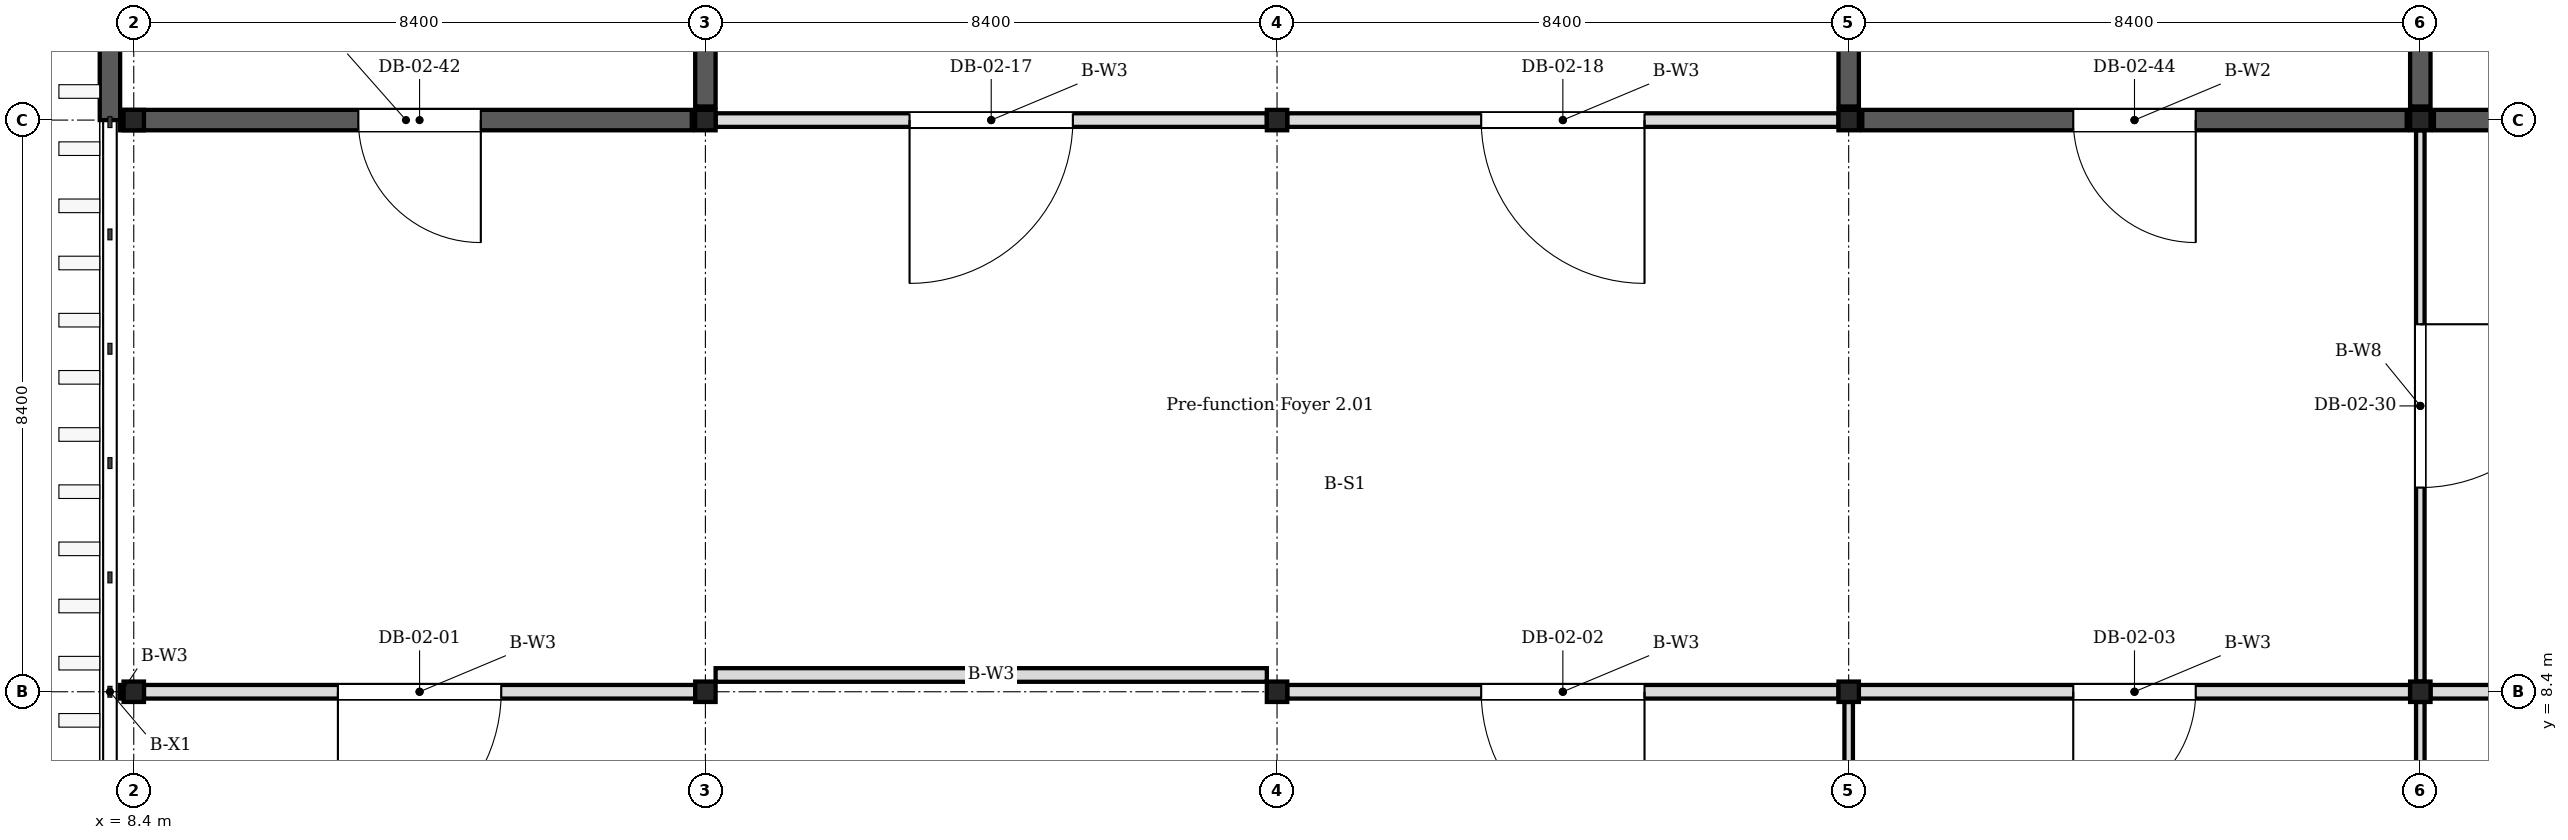
"""IFC4 building model, lengths in metres.
Left out: names, types, materials, properties, quantities, classifications, styles, units other than length and angle.
Written with IfcOpenShell. Run it as: python <this file> out.ifc"""

import sys

from ifc_helpers import new_model, si_unit, direction, frame, frame_2d, origin, origin_2d, place, context, subcontext, project, spatial, rectangle, i_section, extrude, element, fill, save


model = new_model("IFC4")
c1 = context("Model", 3, precision=1e-05, world=origin(), true_north=direction((0.0, 1.0)))
c2 = subcontext(c1, "Body", "Model", "MODEL_VIEW")
j1 = project(units=[si_unit("LENGTHUNIT", "METRE"), si_unit("PLANEANGLEUNIT", "RADIAN")], contexts=[c1])
p1 = place(None, origin())
s1 = spatial("IfcSite", under=j1, at=p1, CompositionType="ELEMENT")
p2 = place(p1, origin())
s2 = spatial("IfcBuilding", under=s1, at=p2, CompositionType="ELEMENT")
p3 = place(p2, frame((0.0, 0.0, 10.2)))
s3 = spatial("IfcBuildingStorey", under=s2, at=p3, CompositionType="ELEMENT", Elevation=10.2)
for number, where, z_axis, x_axis in (
    (1, (8.4, 8.4, 0.0), (0.0, 0.0, 1.0), (1.0, 0.0, 0.0)),
    (2, (8.4, 16.8, 0.0), (0.0, 0.0, 1.0), (1.0, 0.0, 0.0)),
    (3, (16.8, 8.4, 0.0), (0.0, 0.0, 1.0), (1.0, 0.0, 0.0)),
    (4, (16.8, 16.8, 0.0), (0.0, 0.0, 1.0), (1.0, 0.0, 0.0)),
    (5, (25.2, 8.4, 0.0), (0.0, 0.0, 1.0), (1.0, 0.0, 0.0)),
    (6, (25.2, 16.8, 0.0), (0.0, 0.0, 1.0), (1.0, 0.0, 0.0)),
    (7, (33.6, 8.4, 0.0), (0.0, 0.0, 1.0), (1.0, 0.0, 0.0)),
    (8, (33.6, 16.8, 0.0), (0.0, 0.0, 1.0), (1.0, 0.0, 0.0)),
    (9, (42.0, 8.4, 0.0), (0.0, 0.0, 1.0), (1.0, 0.0, 0.0)),
    (10, (42.0, 16.8, 0.0), (0.0, 0.0, 1.0), (1.0, 0.0, 0.0)),
):
    element("IfcColumn", number, at=place(p3, frame(where, z_axis=z_axis, x_axis=x_axis)), inside=s3, PredefinedType="COLUMN", context=c2, shape_type="SweptSolid", body=[
        extrude(i_section(OverallWidth=0.3, OverallDepth=0.3, WebThickness=0.01, FlangeThickness=0.015, FilletRadius=0.013, at=origin_2d()), origin(), (0.0, 0.0, 1.0), 4.2),
    ])
p4 = place(p3, frame((42.0, 17.0, 0.0), z_axis=(0.0, 0.0, 1.0), x_axis=(0.0, 1.0, 0.0)))
e11 = element("IfcWall", 11, at=p4, inside=s3, PredefinedType="SHEAR", context=c2, shape_type="SweptSolid", body=[
    extrude(rectangle(XDim=8.0, YDim=0.3, at=frame_2d((4.0, 0.0))), origin(), (0.0, 0.0, 1.0), 4.05),
])
p5 = place(p3, frame((42.2, 16.8, 0.0), z_axis=(0.0, 0.0, 1.0), x_axis=(1.0, 0.0, 0.0)))
e12 = element("IfcWall", 12, at=p5, inside=s3, PredefinedType="SHEAR", context=c2, shape_type="SweptSolid", body=[
    extrude(rectangle(XDim=8.0, YDim=0.3, at=frame_2d((4.0, 0.0))), origin(), (0.0, 0.0, 1.0), 4.05),
])
p6 = place(p5, frame((3.1, 0.0, 0.0)))
e13 = element("IfcOpeningElement", 13, at=p6, cuts=e12, PredefinedType="OPENING", context=c2, shape_type="SweptSolid", body=[
    extrude(rectangle(XDim=1.8, YDim=2.1, at=frame_2d((0.9, 1.05))), frame((0.0, 0.16, 0.0), z_axis=(0.0, -1.0, 0.0), x_axis=(1.0, 0.0, 0.0)), (0.0, 0.0, 1.0), 0.32),
])
p7 = place(p3, frame((8.05, 16.8, 0.0), z_axis=(0.0, 0.0, 1.0), x_axis=(0.0, 1.0, 0.0)))
e14 = element("IfcWall", 14, at=p7, inside=s3, PredefinedType="SHEAR", context=c2, shape_type="SweptSolid", body=[
    extrude(rectangle(XDim=8.6, YDim=0.3, at=frame_2d((4.3, 0.0))), origin(), (0.0, 0.0, 1.0), 4.05),
])
p8 = place(p3, frame((16.8, 17.0, 0.0), z_axis=(0.0, 0.0, 1.0), x_axis=(0.0, 1.0, 0.0)))
e15 = element("IfcWall", 15, at=p8, inside=s3, PredefinedType="SHEAR", context=c2, shape_type="SweptSolid", body=[
    extrude(rectangle(XDim=8.0, YDim=0.3, at=frame_2d((4.0, 0.0))), origin(), (0.0, 0.0, 1.0), 4.05),
])
p9 = place(p3, frame((8.2, 16.8, 0.0), z_axis=(0.0, 0.0, 1.0), x_axis=(1.0, 0.0, 0.0)))
e16 = element("IfcWall", 16, at=p9, inside=s3, PredefinedType="SHEAR", context=c2, shape_type="SweptSolid", body=[
    extrude(rectangle(XDim=8.4, YDim=0.3, at=frame_2d((4.2, 0.0))), origin(), (0.0, 0.0, 1.0), 4.05),
])
p10 = place(p9, frame((3.5, 0.0, 0.0)))
e17 = element("IfcOpeningElement", 17, at=p10, cuts=e16, PredefinedType="OPENING", context=c2, shape_type="SweptSolid", body=[
    extrude(rectangle(XDim=1.8, YDim=2.1, at=frame_2d((0.9, 1.05))), frame((0.0, 0.16, 0.0), z_axis=(0.0, -1.0, 0.0), x_axis=(1.0, 0.0, 0.0)), (0.0, 0.0, 1.0), 0.32),
])
p11 = place(p3, frame((33.6, 17.0, 0.0), z_axis=(0.0, 0.0, 1.0), x_axis=(0.0, 1.0, 0.0)))
e18 = element("IfcWall", 18, at=p11, inside=s3, PredefinedType="SHEAR", context=c2, shape_type="SweptSolid", body=[
    extrude(rectangle(XDim=8.0, YDim=0.3, at=frame_2d((4.0, 0.0))), origin(), (0.0, 0.0, 1.0), 4.05),
])
p12 = place(p3, frame((33.8, 16.8, 0.0), z_axis=(0.0, 0.0, 1.0), x_axis=(1.0, 0.0, 0.0)))
e19 = element("IfcWall", 19, at=p12, inside=s3, PredefinedType="SHEAR", context=c2, shape_type="SweptSolid", body=[
    extrude(rectangle(XDim=8.0, YDim=0.3, at=frame_2d((4.0, 0.0))), origin(), (0.0, 0.0, 1.0), 4.05),
])
p13 = place(p12, frame((3.1, 0.0, 0.0)))
e20 = element("IfcOpeningElement", 20, at=p13, cuts=e19, PredefinedType="OPENING", context=c2, shape_type="SweptSolid", body=[
    extrude(rectangle(XDim=1.8, YDim=2.1, at=frame_2d((0.9, 1.05))), frame((0.0, 0.16, 0.0), z_axis=(0.0, -1.0, 0.0), x_axis=(1.0, 0.0, 0.0)), (0.0, 0.0, 1.0), 0.32),
])
p14 = place(p3, frame((8.2, 8.4, 0.0), z_axis=(0.0, 0.0, 1.0), x_axis=(1.0, 0.0, 0.0)))
e21 = element("IfcWall", 21, at=p14, inside=s3, PredefinedType="PARTITIONING", context=c2, shape_type="SweptSolid", body=[
    extrude(rectangle(XDim=0.05, YDim=0.2, at=frame_2d((0.025, 0.0))), origin(), (0.0, 0.0, 1.0), 3.35),
])
p15 = place(p3, frame((8.55, 8.4, 0.0), z_axis=(0.0, 0.0, 1.0), x_axis=(1.0, 0.0, 0.0)))
e22 = element("IfcWall", 22, at=p15, inside=s3, PredefinedType="PARTITIONING", context=c2, shape_type="SweptSolid", body=[
    extrude(rectangle(XDim=8.1, YDim=0.2, at=frame_2d((4.05, 0.0))), origin(), (0.0, 0.0, 1.0), 3.35),
])
p16 = place(p15, frame((2.85, 0.0, 0.0)))
e23 = element("IfcOpeningElement", 23, at=p16, cuts=e22, PredefinedType="OPENING", context=c2, shape_type="SweptSolid", body=[
    extrude(rectangle(XDim=2.4, YDim=2.2, at=frame_2d((1.2, 1.1))), frame((0.0, 0.11, 0.0), z_axis=(0.0, -1.0, 0.0), x_axis=(1.0, 0.0, 0.0)), (0.0, 0.0, 1.0), 0.22),
])
p17 = place(p3, frame((16.95, 8.646, 0.0), z_axis=(0.0, 0.0, 1.0), x_axis=(1.0, 0.0, 0.0)))
e24 = element("IfcWall", 24, at=p17, inside=s3, PredefinedType="PARTITIONING", context=c2, shape_type="SweptSolid", body=[
    extrude(rectangle(XDim=8.1, YDim=0.2, at=frame_2d((4.05, 0.0))), origin(), (0.0, 0.0, 1.0), 3.35),
])
p18 = place(p3, frame((25.35, 8.4, 0.0), z_axis=(0.0, 0.0, 1.0), x_axis=(1.0, 0.0, 0.0)))
e25 = element("IfcWall", 25, at=p18, inside=s3, PredefinedType="PARTITIONING", context=c2, shape_type="SweptSolid", body=[
    extrude(rectangle(XDim=8.1, YDim=0.2, at=frame_2d((4.05, 0.0))), origin(), (0.0, 0.0, 1.0), 3.35),
])
p19 = place(p18, frame((2.85, 0.0, 0.0)))
e26 = element("IfcOpeningElement", 26, at=p19, cuts=e25, PredefinedType="OPENING", context=c2, shape_type="SweptSolid", body=[
    extrude(rectangle(XDim=2.4, YDim=2.2, at=frame_2d((1.2, 1.1))), frame((0.0, 0.11, 0.0), z_axis=(0.0, -1.0, 0.0), x_axis=(1.0, 0.0, 0.0)), (0.0, 0.0, 1.0), 0.22),
])
p20 = place(p3, frame((33.75, 8.4, 0.0), z_axis=(0.0, 0.0, 1.0), x_axis=(1.0, 0.0, 0.0)))
e27 = element("IfcWall", 27, at=p20, inside=s3, PredefinedType="PARTITIONING", context=c2, shape_type="SweptSolid", body=[
    extrude(rectangle(XDim=8.1, YDim=0.2, at=frame_2d((4.05, 0.0))), origin(), (0.0, 0.0, 1.0), 3.35),
])
p21 = place(p20, frame((3.15, 0.0, 0.0)))
e28 = element("IfcOpeningElement", 28, at=p21, cuts=e27, PredefinedType="OPENING", context=c2, shape_type="SweptSolid", body=[
    extrude(rectangle(XDim=1.8, YDim=2.1, at=frame_2d((0.9, 1.05))), frame((0.0, 0.11, 0.0), z_axis=(0.0, -1.0, 0.0), x_axis=(1.0, 0.0, 0.0)), (0.0, 0.0, 1.0), 0.22),
])
p22 = place(p3, frame((42.15, 8.4, 0.0), z_axis=(0.0, 0.0, 1.0), x_axis=(1.0, 0.0, 0.0)))
e29 = element("IfcWall", 29, at=p22, inside=s3, PredefinedType="PARTITIONING", context=c2, shape_type="SweptSolid", body=[
    extrude(rectangle(XDim=8.1, YDim=0.2, at=frame_2d((4.05, 0.0))), origin(), (0.0, 0.0, 1.0), 3.35),
])
p23 = place(p22, frame((2.85, 0.0, 0.0)))
e30 = element("IfcOpeningElement", 30, at=p23, cuts=e29, PredefinedType="OPENING", context=c2, shape_type="SweptSolid", body=[
    extrude(rectangle(XDim=2.4, YDim=2.2, at=frame_2d((1.2, 1.1))), frame((0.0, 0.11, 0.0), z_axis=(0.0, -1.0, 0.0), x_axis=(1.0, 0.0, 0.0)), (0.0, 0.0, 1.0), 0.22),
])
p24 = place(p3, frame((16.95, 16.8, 0.0), z_axis=(0.0, 0.0, 1.0), x_axis=(1.0, 0.0, 0.0)))
e31 = element("IfcWall", 31, at=p24, inside=s3, PredefinedType="PARTITIONING", context=c2, shape_type="SweptSolid", body=[
    extrude(rectangle(XDim=8.1, YDim=0.2, at=frame_2d((4.05, 0.0))), origin(), (0.0, 0.0, 1.0), 3.35),
])
p25 = place(p24, frame((2.85, 0.0, 0.0)))
e32 = element("IfcOpeningElement", 32, at=p25, cuts=e31, PredefinedType="OPENING", context=c2, shape_type="SweptSolid", body=[
    extrude(rectangle(XDim=2.4, YDim=2.2, at=frame_2d((1.2, 1.1))), frame((0.0, 0.11, 0.0), z_axis=(0.0, -1.0, 0.0), x_axis=(1.0, 0.0, 0.0)), (0.0, 0.0, 1.0), 0.22),
])
p26 = place(p3, frame((25.35, 16.8, 0.0), z_axis=(0.0, 0.0, 1.0), x_axis=(1.0, 0.0, 0.0)))
e33 = element("IfcWall", 33, at=p26, inside=s3, PredefinedType="PARTITIONING", context=c2, shape_type="SweptSolid", body=[
    extrude(rectangle(XDim=8.1, YDim=0.2, at=frame_2d((4.05, 0.0))), origin(), (0.0, 0.0, 1.0), 3.35),
])
p27 = place(p26, frame((2.85, 0.0, 0.0)))
e34 = element("IfcOpeningElement", 34, at=p27, cuts=e33, PredefinedType="OPENING", context=c2, shape_type="SweptSolid", body=[
    extrude(rectangle(XDim=2.4, YDim=2.2, at=frame_2d((1.2, 1.1))), frame((0.0, 0.11, 0.0), z_axis=(0.0, -1.0, 0.0), x_axis=(1.0, 0.0, 0.0)), (0.0, 0.0, 1.0), 0.22),
])
for number, where, z_axis, x_axis in (
    (35, (33.6, 0.15, 0.0), (0.0, 0.0, 1.0), (0.0, 1.0, 0.0)),
    (36, (42.0, 0.15, 0.0), (0.0, 0.0, 1.0), (0.0, 1.0, 0.0)),
):
    element("IfcWall", number, at=place(p3, frame(where, z_axis=z_axis, x_axis=x_axis)), inside=s3, PredefinedType="MOVABLE", context=c2, shape_type="SweptSolid", body=[
        extrude(rectangle(XDim=8.1, YDim=0.125, at=frame_2d((4.05, 0.0))), origin(), (0.0, 0.0, 1.0), 3.35),
    ])
p28 = place(p3, frame((42.0, 8.55, 0.0), z_axis=(0.0, 0.0, 1.0), x_axis=(0.0, 1.0, 0.0)))
e37 = element("IfcWall", 37, at=p28, inside=s3, PredefinedType="PARTITIONING", context=c2, shape_type="SweptSolid", body=[
    extrude(rectangle(XDim=8.1, YDim=0.125, at=frame_2d((4.05, 0.0))), origin(), (0.0, 0.0, 1.0), 3.35),
])
p29 = place(p28, frame((2.85, 0.0, 0.0)))
e38 = element("IfcOpeningElement", 38, at=p29, cuts=e37, PredefinedType="OPENING", context=c2, shape_type="SweptSolid", body=[
    extrude(rectangle(XDim=2.4, YDim=2.2, at=frame_2d((1.2, 1.1))), frame((0.0, 0.073, 0.0), z_axis=(0.0, -1.0, 0.0), x_axis=(1.0, 0.0, 0.0)), (0.0, 0.0, 1.0), 0.145),
])
p30 = place(p16, origin())
e39 = element("IfcDoor", 39, at=p30, inside=s3, OperationType="DOUBLE_DOOR_SINGLE_SWING", PredefinedType="DOOR", context=c2, shape_type="SweptSolid", body=[
    extrude(rectangle(XDim=2.4, YDim=2.2, at=frame_2d((1.2, 1.1))), frame((0.0, 0.025, 0.0), z_axis=(0.0, -1.0, 0.0), x_axis=(1.0, 0.0, 0.0)), (0.0, 0.0, 1.0), 0.05),
])
fill(e23, e39)
p31 = place(p19, origin())
e40 = element("IfcDoor", 40, at=p31, inside=s3, OperationType="DOUBLE_DOOR_SINGLE_SWING", PredefinedType="DOOR", context=c2, shape_type="SweptSolid", body=[
    extrude(rectangle(XDim=2.4, YDim=2.2, at=frame_2d((1.2, 1.1))), frame((0.0, 0.025, 0.0), z_axis=(0.0, -1.0, 0.0), x_axis=(1.0, 0.0, 0.0)), (0.0, 0.0, 1.0), 0.05),
])
fill(e26, e40)
p32 = place(p21, origin())
e41 = element("IfcDoor", 41, at=p32, inside=s3, OperationType="DOUBLE_DOOR_SINGLE_SWING", PredefinedType="DOOR", context=c2, shape_type="SweptSolid", body=[
    extrude(rectangle(XDim=1.8, YDim=2.1, at=frame_2d((0.9, 1.05))), frame((0.0, 0.025, 0.0), z_axis=(0.0, -1.0, 0.0), x_axis=(1.0, 0.0, 0.0)), (0.0, 0.0, 1.0), 0.05),
])
fill(e28, e41)
p33 = place(p25, origin())
e42 = element("IfcDoor", 42, at=p33, inside=s3, OperationType="DOUBLE_DOOR_SINGLE_SWING", PredefinedType="DOOR", context=c2, shape_type="SweptSolid", body=[
    extrude(rectangle(XDim=2.4, YDim=2.2, at=frame_2d((1.2, 1.1))), frame((0.0, 0.025, 0.0), z_axis=(0.0, -1.0, 0.0), x_axis=(1.0, 0.0, 0.0)), (0.0, 0.0, 1.0), 0.05),
])
fill(e32, e42)
p34 = place(p27, origin())
e43 = element("IfcDoor", 43, at=p34, inside=s3, OperationType="DOUBLE_DOOR_SINGLE_SWING", PredefinedType="DOOR", context=c2, shape_type="SweptSolid", body=[
    extrude(rectangle(XDim=2.4, YDim=2.2, at=frame_2d((1.2, 1.1))), frame((0.0, 0.025, 0.0), z_axis=(0.0, -1.0, 0.0), x_axis=(1.0, 0.0, 0.0)), (0.0, 0.0, 1.0), 0.05),
])
fill(e34, e43)
p35 = place(p29, origin())
e44 = element("IfcDoor", 44, at=p35, inside=s3, OperationType="DOUBLE_DOOR_SINGLE_SWING", PredefinedType="DOOR", context=c2, shape_type="SweptSolid", body=[
    extrude(rectangle(XDim=2.4, YDim=2.2, at=frame_2d((1.2, 1.1))), frame((0.0, 0.025, 0.0), z_axis=(0.0, -1.0, 0.0), x_axis=(1.0, 0.0, 0.0)), (0.0, 0.0, 1.0), 0.05),
])
fill(e38, e44)
p36 = place(p10, origin())
e45 = element("IfcDoor", 45, at=p36, inside=s3, OperationType="DOUBLE_DOOR_SINGLE_SWING", PredefinedType="DOOR", context=c2, shape_type="SweptSolid", body=[
    extrude(rectangle(XDim=1.8, YDim=2.1, at=frame_2d((0.9, 1.05))), frame((0.0, 0.025, 0.0), z_axis=(0.0, -1.0, 0.0), x_axis=(1.0, 0.0, 0.0)), (0.0, 0.0, 1.0), 0.05),
])
fill(e17, e45)
p37 = place(p13, origin())
e46 = element("IfcDoor", 46, at=p37, inside=s3, OperationType="DOUBLE_DOOR_SINGLE_SWING", PredefinedType="DOOR", context=c2, shape_type="SweptSolid", body=[
    extrude(rectangle(XDim=1.8, YDim=2.1, at=frame_2d((0.9, 1.05))), frame((0.0, 0.025, 0.0), z_axis=(0.0, -1.0, 0.0), x_axis=(1.0, 0.0, 0.0)), (0.0, 0.0, 1.0), 0.05),
])
fill(e20, e46)
save(model, sys.argv[1])
